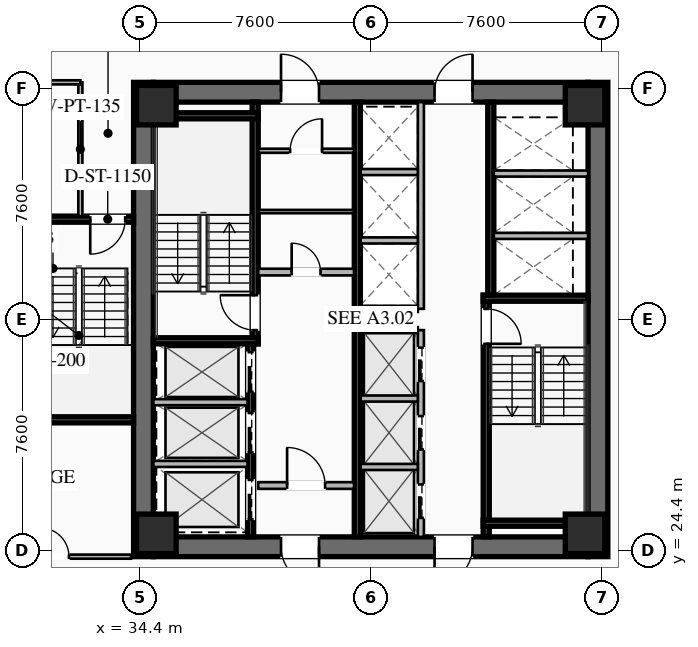
"""IFC4 building model, lengths in metres.
Left out: names, types, materials, properties, quantities, classifications, styles, units other than length and angle.
Written with IfcOpenShell. Run it as: python <this file> out.ifc"""

import sys

from ifc_helpers import new_model, si_unit, direction, frame, frame_2d, origin, origin_2d, place, context, subcontext, project, spatial, rectangle, hollow_rectangle, extrude, element, fill, save


model = new_model("IFC4")
c1 = context("Model", 3, precision=1e-05, world=origin(), true_north=direction((0.0, 1.0)))
c2 = subcontext(c1, "Body", "Model", "MODEL_VIEW")
j1 = project(units=[si_unit("LENGTHUNIT", "METRE"), si_unit("PLANEANGLEUNIT", "RADIAN")], contexts=[c1])
p1 = place(None, origin())
s1 = spatial("IfcSite", under=j1, at=p1, CompositionType="ELEMENT")
p2 = place(p1, origin())
s2 = spatial("IfcBuilding", under=s1, at=p2, CompositionType="ELEMENT")
p3 = place(p2, frame((0.0, 0.0, 42.35)))
s3 = spatial("IfcBuildingStorey", under=s2, at=p3, CompositionType="ELEMENT", Elevation=42.35)
for number, where, z_axis, x_axis in (
    (1, (34.525, 24.2, 0.0), (0.0, 0.0, 1.0), (0.0, 1.0, 0.0)),
    (2, (49.475, 39.8, 0.0), (0.0, 0.0, 1.0), (0.0, -1.0, 0.0)),
):
    element("IfcWall", number, at=place(p3, frame(where, z_axis=z_axis, x_axis=x_axis)), inside=s3, PredefinedType="SHEAR", context=c2, shape_type="SweptSolid", body=[
        extrude(rectangle(XDim=15.6, YDim=0.65, at=frame_2d((7.8, 0.0))), origin(), (0.0, 0.0, 1.0), 3.55),
    ])
p4 = place(p3, frame((49.15, 24.525, 0.0), z_axis=(0.0, 0.0, 1.0), x_axis=(-1.0, 0.0, 0.0)))
e3 = element("IfcWall", 3, at=p4, inside=s3, PredefinedType="SHEAR", context=c2, shape_type="SweptSolid", body=[
    extrude(rectangle(XDim=14.3, YDim=0.65, at=frame_2d((7.15, 0.0))), origin(), (0.0, 0.0, 1.0), 3.55),
])
p5 = place(p4, frame((8.85, 0.0, 0.0)))
e4 = element("IfcOpeningElement", 4, at=p5, cuts=e3, PredefinedType="OPENING", context=c2, shape_type="SweptSolid", body=[
    extrude(rectangle(XDim=1.25, YDim=2.25, at=frame_2d((0.625, 1.125))), frame((0.0, 0.335, 0.0), z_axis=(0.0, -1.0, 0.0), x_axis=(1.0, 0.0, 0.0)), (0.0, 0.0, 1.0), 0.67),
])
p6 = place(p4, frame((3.8, 0.0, 0.0)))
e5 = element("IfcOpeningElement", 5, at=p6, cuts=e3, PredefinedType="OPENING", context=c2, shape_type="SweptSolid", body=[
    extrude(rectangle(XDim=1.25, YDim=2.25, at=frame_2d((0.625, 1.125))), frame((0.0, 0.335, 0.0), z_axis=(0.0, -1.0, 0.0), x_axis=(1.0, 0.0, 0.0)), (0.0, 0.0, 1.0), 0.67),
])
p7 = place(p3, frame((34.85, 39.475, 0.0), z_axis=(0.0, 0.0, 1.0), x_axis=(1.0, 0.0, 0.0)))
e6 = element("IfcWall", 6, at=p7, inside=s3, PredefinedType="SHEAR", context=c2, shape_type="SweptSolid", body=[
    extrude(rectangle(XDim=14.3, YDim=0.65, at=frame_2d((7.15, 0.0))), origin(), (0.0, 0.0, 1.0), 3.55),
])
p8 = place(p7, frame((4.2, 0.0, 0.0)))
e7 = element("IfcOpeningElement", 7, at=p8, cuts=e6, PredefinedType="OPENING", context=c2, shape_type="SweptSolid", body=[
    extrude(rectangle(XDim=1.25, YDim=2.25, at=frame_2d((0.625, 1.125))), frame((0.0, 0.335, 0.0), z_axis=(0.0, -1.0, 0.0), x_axis=(1.0, 0.0, 0.0)), (0.0, 0.0, 1.0), 0.67),
])
p9 = place(p7, frame((9.25, 0.0, 0.0)))
e8 = element("IfcOpeningElement", 8, at=p9, cuts=e6, PredefinedType="OPENING", context=c2, shape_type="SweptSolid", body=[
    extrude(rectangle(XDim=1.25, YDim=2.25, at=frame_2d((0.625, 1.125))), frame((0.0, 0.335, 0.0), z_axis=(0.0, -1.0, 0.0), x_axis=(1.0, 0.0, 0.0)), (0.0, 0.0, 1.0), 0.67),
])
for number, where, z_axis, x_axis in (
    (9, (34.95, 24.95, 0.0), (0.0, 0.0, 1.0), (1.0, 0.0, 0.0)),
    (10, (49.05, 24.95, 0.0), (0.0, 0.0, 1.0), (1.0, 0.0, 0.0)),
    (11, (49.05, 39.05, 0.0), (0.0, 0.0, 1.0), (1.0, 0.0, 0.0)),
    (12, (34.95, 39.05, 0.0), (0.0, 0.0, 1.0), (1.0, 0.0, 0.0)),
):
    element("IfcColumn", number, at=place(p3, frame(where, z_axis=z_axis, x_axis=x_axis)), inside=s3, PredefinedType="COLUMN", context=c2, shape_type="SweptSolid", body=[
        extrude(hollow_rectangle(XDim=1.3, YDim=1.3, WallThickness=0.05, at=origin_2d()), origin(), (0.0, 0.0, 1.0), 3.35),
    ])
p10 = place(p3, frame((38.2, 31.2, 0.0), z_axis=(0.0, 0.0, 1.0), x_axis=(0.0, 1.0, 0.0)))
e13 = element("IfcWall", 13, at=p10, inside=s3, PredefinedType="SHEAR", context=c2, shape_type="SweptSolid", body=[
    extrude(rectangle(XDim=7.95, YDim=0.2, at=frame_2d((3.975, 0.0))), origin(), (0.0, 0.0, 1.0), 3.35),
])
p11 = place(p10, frame((0.45, 0.0, 0.0)))
e14 = element("IfcOpeningElement", 14, at=p11, cuts=e13, PredefinedType="OPENING", context=c2, shape_type="SweptSolid", body=[
    extrude(rectangle(XDim=1.15, YDim=2.2, at=frame_2d((0.575, 1.1))), frame((0.0, 0.11, 0.0), z_axis=(0.0, -1.0, 0.0), x_axis=(1.0, 0.0, 0.0)), (0.0, 0.0, 1.0), 0.22),
])
for number, where, z_axis, x_axis in (
    (15, (34.85, 31.3, 0.0), (0.0, 0.0, 1.0), (1.0, 0.0, 0.0)),
    (16, (34.85, 38.7, 0.0), (0.0, 0.0, 1.0), (1.0, 0.0, 0.0)),
):
    element("IfcWall", number, at=place(p3, frame(where, z_axis=z_axis, x_axis=x_axis)), inside=s3, PredefinedType="SHEAR", context=c2, shape_type="SweptSolid", body=[
        extrude(rectangle(XDim=3.45, YDim=0.2, at=frame_2d((1.725, 0.0))), origin(), (0.0, 0.0, 1.0), 3.35),
    ])
p12 = place(p3, frame((45.8, 32.8, 0.0), z_axis=(0.0, 0.0, 1.0), x_axis=(0.0, -1.0, 0.0)))
e17 = element("IfcWall", 17, at=p12, inside=s3, PredefinedType="SHEAR", context=c2, shape_type="SweptSolid", body=[
    extrude(rectangle(XDim=7.95, YDim=0.2, at=frame_2d((3.975, 0.0))), origin(), (0.0, 0.0, 1.0), 3.35),
])
p13 = place(p12, frame((0.45, 0.0, 0.0)))
e18 = element("IfcOpeningElement", 18, at=p13, cuts=e17, PredefinedType="OPENING", context=c2, shape_type="SweptSolid", body=[
    extrude(rectangle(XDim=1.15, YDim=2.2, at=frame_2d((0.575, 1.1))), frame((0.0, 0.11, 0.0), z_axis=(0.0, -1.0, 0.0), x_axis=(1.0, 0.0, 0.0)), (0.0, 0.0, 1.0), 0.22),
])
for number, where, z_axis, x_axis in (
    (19, (45.7, 32.7, 0.0), (0.0, 0.0, 1.0), (1.0, 0.0, 0.0)),
    (20, (45.7, 25.3, 0.0), (0.0, 0.0, 1.0), (1.0, 0.0, 0.0)),
):
    element("IfcWall", number, at=place(p3, frame(where, z_axis=z_axis, x_axis=x_axis)), inside=s3, PredefinedType="SHEAR", context=c2, shape_type="SweptSolid", body=[
        extrude(rectangle(XDim=3.45, YDim=0.2, at=frame_2d((1.725, 0.0))), origin(), (0.0, 0.0, 1.0), 3.35),
    ])
p14 = place(p3, frame((41.56, 24.85, 0.0), z_axis=(0.0, 0.0, 1.0), x_axis=(0.0, 1.0, 0.0)))
e21 = element("IfcWall", 21, at=p14, inside=s3, PredefinedType="SHEAR", context=c2, shape_type="SweptSolid", body=[
    extrude(rectangle(XDim=14.3, YDim=0.2, at=frame_2d((7.15, 0.0))), origin(), (0.0, 0.0, 1.0), 3.35),
])
p15 = place(p3, frame((38.3, 33.56, 0.0), z_axis=(0.0, 0.0, 1.0), x_axis=(1.0, 0.0, 0.0)))
e22 = element("IfcWall", 22, at=p15, inside=s3, PredefinedType="SOLIDWALL", context=c2, shape_type="SweptSolid", body=[
    extrude(rectangle(XDim=3.15, YDim=0.22, at=frame_2d((1.575, 0.0))), origin(), (0.0, 0.0, 1.0), 2.703),
])
p16 = place(p15, frame((1.1, 0.0, 0.0)))
e23 = element("IfcOpeningElement", 23, at=p16, cuts=e22, PredefinedType="OPENING", context=c2, shape_type="SweptSolid", body=[
    extrude(rectangle(XDim=0.95, YDim=2.05, at=frame_2d((0.475, 1.025))), frame((0.0, 0.12, 0.0), z_axis=(0.0, -1.0, 0.0), x_axis=(1.0, 0.0, 0.0)), (0.0, 0.0, 1.0), 0.24),
])
p17 = place(p3, frame((38.3, 26.54, 0.0), z_axis=(0.0, 0.0, 1.0), x_axis=(1.0, 0.0, 0.0)))
e24 = element("IfcWall", 24, at=p17, inside=s3, PredefinedType="SOLIDWALL", context=c2, shape_type="SweptSolid", body=[
    extrude(rectangle(XDim=3.15, YDim=0.22, at=frame_2d((1.575, 0.0))), origin(), (0.0, 0.0, 1.0), 2.703),
])
p18 = place(p17, frame((0.95, 0.0, 0.0)))
e25 = element("IfcOpeningElement", 25, at=p18, cuts=e24, PredefinedType="OPENING", context=c2, shape_type="SweptSolid", body=[
    extrude(rectangle(XDim=1.25, YDim=2.25, at=frame_2d((0.625, 1.125))), frame((0.0, 0.12, 0.0), z_axis=(0.0, -1.0, 0.0), x_axis=(1.0, 0.0, 0.0)), (0.0, 0.0, 1.0), 0.24),
])
p19 = place(p3, frame((38.05, 24.85, 0.0), z_axis=(0.0, 0.0, 1.0), x_axis=(0.0, 1.0, 0.0)))
e26 = element("IfcWall", 26, at=p19, inside=s3, PredefinedType="SHEAR", context=c2, shape_type="SweptSolid", body=[
    extrude(rectangle(XDim=6.35, YDim=0.2, at=frame_2d((3.175, 0.0))), origin(), (0.0, 0.0, 1.0), 3.35),
])
p20 = place(p19, frame((4.775, 0.0, 0.0)))
e27 = element("IfcOpeningElement", 27, at=p20, cuts=e26, PredefinedType="OPENING", context=c2, shape_type="SweptSolid", body=[
    extrude(rectangle(XDim=1.3, YDim=2.25, at=frame_2d((0.65, 1.125))), frame((0.0, 0.11, 0.0), z_axis=(0.0, -1.0, 0.0), x_axis=(1.0, 0.0, 0.0)), (0.0, 0.0, 1.0), 0.22),
])
p21 = place(p19, frame((2.775, 0.0, 0.0)))
e28 = element("IfcOpeningElement", 28, at=p21, cuts=e26, PredefinedType="OPENING", context=c2, shape_type="SweptSolid", body=[
    extrude(rectangle(XDim=1.3, YDim=2.25, at=frame_2d((0.65, 1.125))), frame((0.0, 0.11, 0.0), z_axis=(0.0, -1.0, 0.0), x_axis=(1.0, 0.0, 0.0)), (0.0, 0.0, 1.0), 0.22),
])
p22 = place(p19, frame((0.575, 0.0, 0.0)))
e29 = element("IfcOpeningElement", 29, at=p22, cuts=e26, PredefinedType="OPENING", context=c2, shape_type="SweptSolid", body=[
    extrude(rectangle(XDim=1.3, YDim=2.25, at=frame_2d((0.65, 1.125))), frame((0.0, 0.11, 0.0), z_axis=(0.0, -1.0, 0.0), x_axis=(1.0, 0.0, 0.0)), (0.0, 0.0, 1.0), 0.22),
])
for number, where, z_axis, x_axis in (
    (30, (34.85, 27.25, 0.0), (0.0, 0.0, 1.0), (1.0, 0.0, 0.0)),
    (31, (34.85, 29.28, 0.0), (0.0, 0.0, 1.0), (1.0, 0.0, 0.0)),
):
    element("IfcWall", number, at=place(p3, frame(where, z_axis=z_axis, x_axis=x_axis)), inside=s3, PredefinedType="SOLIDWALL", context=c2, shape_type="SweptSolid", body=[
        extrude(rectangle(XDim=3.1, YDim=0.2, at=frame_2d((1.55, 0.0))), origin(), (0.0, 0.0, 1.0), 3.35),
    ])
p23 = place(p3, frame((45.95, 39.15, 0.0), z_axis=(0.0, 0.0, 1.0), x_axis=(0.0, -1.0, 0.0)))
e32 = element("IfcWall", 32, at=p23, inside=s3, PredefinedType="SHEAR", context=c2, shape_type="SweptSolid", body=[
    extrude(rectangle(XDim=6.35, YDim=0.2, at=frame_2d((3.175, 0.0))), origin(), (0.0, 0.0, 1.0), 3.35),
])
for number, where, z_axis, x_axis in (
    (33, (46.05, 34.75, 0.0), (0.0, 0.0, 1.0), (1.0, 0.0, 0.0)),
    (34, (46.05, 36.8, 0.0), (0.0, 0.0, 1.0), (1.0, 0.0, 0.0)),
):
    element("IfcWall", number, at=place(p3, frame(where, z_axis=z_axis, x_axis=x_axis)), inside=s3, PredefinedType="SOLIDWALL", context=c2, shape_type="SweptSolid", body=[
        extrude(rectangle(XDim=3.1, YDim=0.2, at=frame_2d((1.55, 0.0))), origin(), (0.0, 0.0, 1.0), 3.35),
    ])
p24 = place(p3, frame((38.3, 37.55, 0.0), z_axis=(0.0, 0.0, 1.0), x_axis=(1.0, 0.0, 0.0)))
e35 = element("IfcWall", 35, at=p24, inside=s3, PredefinedType="PARTITIONING", context=c2, shape_type="SweptSolid", body=[
    extrude(rectangle(XDim=3.15, YDim=0.135, at=frame_2d((1.575, 0.0))), origin(), (0.0, 0.0, 1.0), 2.703),
])
p25 = place(p24, frame((1.05, 0.0, 0.0)))
e36 = element("IfcOpeningElement", 36, at=p25, cuts=e35, PredefinedType="OPENING", context=c2, shape_type="SweptSolid", body=[
    extrude(rectangle(XDim=1.05, YDim=2.2, at=frame_2d((0.525, 1.1))), frame((0.0, 0.077, 0.0), z_axis=(0.0, -1.0, 0.0), x_axis=(1.0, 0.0, 0.0)), (0.0, 0.0, 1.0), 0.155),
])
p26 = place(p3, frame((38.3, 35.55, 0.0), z_axis=(0.0, 0.0, 1.0), x_axis=(1.0, 0.0, 0.0)))
e37 = element("IfcWall", 37, at=p26, inside=s3, PredefinedType="PARTITIONING", context=c2, shape_type="SweptSolid", body=[
    extrude(rectangle(XDim=3.15, YDim=0.11, at=frame_2d((1.575, 0.0))), origin(), (0.0, 0.0, 1.0), 2.703),
])
p27 = place(p3, frame((43.65, 24.85, 0.0), z_axis=(0.0, 0.0, 1.0), x_axis=(0.0, 1.0, 0.0)))
e38 = element("IfcWall", 38, at=p27, inside=s3, PredefinedType="SOLIDWALL", context=c2, shape_type="SweptSolid", body=[
    extrude(rectangle(XDim=6.8, YDim=0.2, at=frame_2d((3.4, 0.0))), origin(), (0.0, 0.0, 1.0), 3.35),
])
p28 = place(p27, frame((0.625, 0.0, 0.0)))
e39 = element("IfcOpeningElement", 39, at=p28, cuts=e38, PredefinedType="OPENING", context=c2, shape_type="SweptSolid", body=[
    extrude(rectangle(XDim=1.1, YDim=2.2, at=frame_2d((0.55, 1.1))), frame((0.0, 0.11, 0.0), z_axis=(0.0, -1.0, 0.0), x_axis=(1.0, 0.0, 0.0)), (0.0, 0.0, 1.0), 0.22),
])
p29 = place(p27, frame((2.875, 0.0, 0.0)))
e40 = element("IfcOpeningElement", 40, at=p29, cuts=e38, PredefinedType="OPENING", context=c2, shape_type="SweptSolid", body=[
    extrude(rectangle(XDim=1.1, YDim=2.2, at=frame_2d((0.55, 1.1))), frame((0.0, 0.11, 0.0), z_axis=(0.0, -1.0, 0.0), x_axis=(1.0, 0.0, 0.0)), (0.0, 0.0, 1.0), 0.22),
])
p30 = place(p27, frame((5.125, 0.0, 0.0)))
e41 = element("IfcOpeningElement", 41, at=p30, cuts=e38, PredefinedType="OPENING", context=c2, shape_type="SweptSolid", body=[
    extrude(rectangle(XDim=1.1, YDim=2.2, at=frame_2d((0.55, 1.1))), frame((0.0, 0.11, 0.0), z_axis=(0.0, -1.0, 0.0), x_axis=(1.0, 0.0, 0.0)), (0.0, 0.0, 1.0), 0.22),
])
for number, where, z_axis, x_axis in (
    (42, (41.67, 27.15, 0.0), (0.0, 0.0, 1.0), (1.0, 0.0, 0.0)),
    (43, (41.67, 29.4, 0.0), (0.0, 0.0, 1.0), (1.0, 0.0, 0.0)),
    (44, (41.67, 31.65, 0.0), (0.0, 0.0, 1.0), (1.0, 0.0, 0.0)),
):
    element("IfcWall", number, at=place(p3, frame(where, z_axis=z_axis, x_axis=x_axis)), inside=s3, PredefinedType="SOLIDWALL", context=c2, shape_type="SweptSolid", body=[
        extrude(rectangle(XDim=1.88, YDim=0.2, at=frame_2d((0.94, 0.0))), origin(), (0.0, 0.0, 1.0), 3.35),
    ])
p31 = place(p3, frame((43.65, 32.35, 0.0), z_axis=(0.0, 0.0, 1.0), x_axis=(0.0, 1.0, 0.0)))
e45 = element("IfcWall", 45, at=p31, inside=s3, PredefinedType="SOLIDWALL", context=c2, shape_type="SweptSolid", body=[
    extrude(rectangle(XDim=6.8, YDim=0.2, at=frame_2d((3.4, 0.0))), origin(), (0.0, 0.0, 1.0), 3.35),
])
for number, where, z_axis, x_axis in (
    (46, (41.67, 32.35, 0.0), (0.0, 0.0, 1.0), (1.0, 0.0, 0.0)),
    (47, (41.67, 34.6, 0.0), (0.0, 0.0, 1.0), (1.0, 0.0, 0.0)),
    (48, (41.67, 36.85, 0.0), (0.0, 0.0, 1.0), (1.0, 0.0, 0.0)),
):
    element("IfcWall", number, at=place(p3, frame(where, z_axis=z_axis, x_axis=x_axis)), inside=s3, PredefinedType="SOLIDWALL", context=c2, shape_type="SweptSolid", body=[
        extrude(rectangle(XDim=1.88, YDim=0.2, at=frame_2d((0.94, 0.0))), origin(), (0.0, 0.0, 1.0), 3.35),
    ])
p32 = place(p3, frame((34.2, 35.3, 0.0), z_axis=(0.0, 0.0, 1.0), x_axis=(-1.0, 0.0, 0.0)))
e49 = element("IfcWall", 49, at=p32, inside=s3, PredefinedType="SHEAR", context=c2, shape_type="SweptSolid", body=[
    extrude(rectangle(XDim=3.4, YDim=0.2, at=frame_2d((1.7, 0.0))), origin(), (0.0, 0.0, 1.0), 3.35),
])
p33 = place(p32, frame((0.275, 0.0, 0.0)))
e50 = element("IfcOpeningElement", 50, at=p33, cuts=e49, PredefinedType="OPENING", context=c2, shape_type="SweptSolid", body=[
    extrude(rectangle(XDim=1.15, YDim=2.2, at=frame_2d((0.575, 1.1))), frame((0.0, 0.11, 0.0), z_axis=(0.0, -1.0, 0.0), x_axis=(1.0, 0.0, 0.0)), (0.0, 0.0, 1.0), 0.22),
])
p34 = place(p3, frame((30.8, 28.7, 0.0), z_axis=(0.0, 0.0, 1.0), x_axis=(1.0, 0.0, 0.0)))
e51 = element("IfcWall", 51, at=p34, inside=s3, PredefinedType="SHEAR", context=c2, shape_type="SweptSolid", body=[
    extrude(rectangle(XDim=3.4, YDim=0.2, at=frame_2d((1.7, 0.0))), origin(), (0.0, 0.0, 1.0), 3.35),
])
p35 = place(p3, frame((32.45, 35.4, 0.0), z_axis=(0.0, 0.0, 1.0), x_axis=(0.0, 1.0, 0.0)))
e52 = element("IfcWall", 52, at=p35, inside=s3, PredefinedType="PARTITIONING", context=c2, shape_type="SweptSolid", body=[
    extrude(rectangle(XDim=4.4, YDim=0.135, at=frame_2d((2.2, 0.0))), origin(), (0.0, 0.0, 1.0), 2.703),
])
p36 = place(p3, frame((32.45, 39.8, 0.0), z_axis=(0.0, 0.0, 1.0), x_axis=(-1.0, 0.0, 0.0)))
e53 = element("IfcWall", 53, at=p36, inside=s3, PredefinedType="PARTITIONING", context=c2, shape_type="SweptSolid", body=[
    extrude(rectangle(XDim=13.18, YDim=0.135, at=frame_2d((6.59, 0.0))), origin(), (0.0, 0.0, 1.0), 2.703),
])
p37 = place(p36, frame((5.84, 0.0, 0.0)))
e54 = element("IfcOpeningElement", 54, at=p37, cuts=e53, PredefinedType="OPENING", context=c2, shape_type="SweptSolid", body=[
    extrude(rectangle(XDim=0.95, YDim=2.05, at=frame_2d((0.475, 1.025))), frame((0.0, 0.077, 0.0), z_axis=(0.0, -1.0, 0.0), x_axis=(1.0, 0.0, 0.0)), (0.0, 0.0, 1.0), 0.155),
])
p38 = place(p3, frame((19.27, 24.2, 0.0), z_axis=(0.0, 0.0, 1.0), x_axis=(1.0, 0.0, 0.0)))
e55 = element("IfcWall", 55, at=p38, inside=s3, PredefinedType="PARTITIONING", context=c2, shape_type="SweptSolid", body=[
    extrude(rectangle(XDim=14.85, YDim=0.135, at=frame_2d((7.425, 0.0))), origin(), (0.0, 0.0, 1.0), 2.703),
])
p39 = place(p38, frame((11.855, 0.0, 0.0)))
e56 = element("IfcOpeningElement", 56, at=p39, cuts=e55, PredefinedType="OPENING", context=c2, shape_type="SweptSolid", body=[
    extrude(rectangle(XDim=0.95, YDim=2.05, at=frame_2d((0.475, 1.025))), frame((0.0, 0.077, 0.0), z_axis=(0.0, -1.0, 0.0), x_axis=(1.0, 0.0, 0.0)), (0.0, 0.0, 1.0), 0.155),
])
p40 = place(p8, origin())
e57 = element("IfcDoor", 57, at=p40, inside=s3, OperationType="SINGLE_SWING_LEFT", PredefinedType="DOOR", context=c2, shape_type="SweptSolid", body=[
    extrude(rectangle(XDim=1.25, YDim=2.25, at=frame_2d((0.625, 1.125))), frame((0.0, 0.025, 0.0), z_axis=(0.0, -1.0, 0.0), x_axis=(1.0, 0.0, 0.0)), (0.0, 0.0, 1.0), 0.05),
])
fill(e7, e57)
p41 = place(p9, origin())
e58 = element("IfcDoor", 58, at=p41, inside=s3, OperationType="SINGLE_SWING_RIGHT", PredefinedType="DOOR", context=c2, shape_type="SweptSolid", body=[
    extrude(rectangle(XDim=1.25, YDim=2.25, at=frame_2d((0.625, 1.125))), frame((0.0, 0.025, 0.0), z_axis=(0.0, -1.0, 0.0), x_axis=(1.0, 0.0, 0.0)), (0.0, 0.0, 1.0), 0.05),
])
fill(e8, e58)
p42 = place(p5, origin())
e59 = element("IfcDoor", 59, at=p42, inside=s3, OperationType="SINGLE_SWING_LEFT", PredefinedType="DOOR", context=c2, shape_type="SweptSolid", body=[
    extrude(rectangle(XDim=1.25, YDim=2.25, at=frame_2d((0.625, 1.125))), frame((0.0, 0.025, 0.0), z_axis=(0.0, -1.0, 0.0), x_axis=(1.0, 0.0, 0.0)), (0.0, 0.0, 1.0), 0.05),
])
fill(e4, e59)
p43 = place(p6, origin())
e60 = element("IfcDoor", 60, at=p43, inside=s3, OperationType="SINGLE_SWING_RIGHT", PredefinedType="DOOR", context=c2, shape_type="SweptSolid", body=[
    extrude(rectangle(XDim=1.25, YDim=2.25, at=frame_2d((0.625, 1.125))), frame((0.0, 0.025, 0.0), z_axis=(0.0, -1.0, 0.0), x_axis=(1.0, 0.0, 0.0)), (0.0, 0.0, 1.0), 0.05),
])
fill(e5, e60)
p44 = place(p11, origin())
e61 = element("IfcDoor", 61, at=p44, inside=s3, OperationType="SINGLE_SWING_RIGHT", PredefinedType="DOOR", context=c2, shape_type="SweptSolid", body=[
    extrude(rectangle(XDim=1.15, YDim=2.2, at=frame_2d((0.575, 1.1))), frame((0.0, 0.025, 0.0), z_axis=(0.0, -1.0, 0.0), x_axis=(1.0, 0.0, 0.0)), (0.0, 0.0, 1.0), 0.05),
])
fill(e14, e61)
p45 = place(p13, origin())
e62 = element("IfcDoor", 62, at=p45, inside=s3, OperationType="SINGLE_SWING_RIGHT", PredefinedType="DOOR", context=c2, shape_type="SweptSolid", body=[
    extrude(rectangle(XDim=1.15, YDim=2.2, at=frame_2d((0.575, 1.1))), frame((0.0, 0.025, 0.0), z_axis=(0.0, -1.0, 0.0), x_axis=(1.0, 0.0, 0.0)), (0.0, 0.0, 1.0), 0.05),
])
fill(e18, e62)
p46 = place(p18, origin())
e63 = element("IfcDoor", 63, at=p46, inside=s3, OperationType="SINGLE_SWING_LEFT", PredefinedType="DOOR", context=c2, shape_type="SweptSolid", body=[
    extrude(rectangle(XDim=1.25, YDim=2.25, at=frame_2d((0.625, 1.125))), frame((0.0, 0.025, 0.0), z_axis=(0.0, -1.0, 0.0), x_axis=(1.0, 0.0, 0.0)), (0.0, 0.0, 1.0), 0.05),
])
fill(e25, e63)
p47 = place(p25, origin())
e64 = element("IfcDoor", 64, at=p47, inside=s3, OperationType="SINGLE_SWING_RIGHT", PredefinedType="DOOR", context=c2, shape_type="SweptSolid", body=[
    extrude(rectangle(XDim=1.05, YDim=2.2, at=frame_2d((0.525, 1.1))), frame((0.0, 0.025, 0.0), z_axis=(0.0, -1.0, 0.0), x_axis=(1.0, 0.0, 0.0)), (0.0, 0.0, 1.0), 0.05),
])
fill(e36, e64)
p48 = place(p16, origin())
e65 = element("IfcDoor", 65, at=p48, inside=s3, OperationType="SINGLE_SWING_LEFT", PredefinedType="DOOR", context=c2, shape_type="SweptSolid", body=[
    extrude(rectangle(XDim=0.95, YDim=2.05, at=frame_2d((0.475, 1.025))), frame((0.0, 0.025, 0.0), z_axis=(0.0, -1.0, 0.0), x_axis=(1.0, 0.0, 0.0)), (0.0, 0.0, 1.0), 0.05),
])
fill(e23, e65)
p49 = place(p33, origin())
e66 = element("IfcDoor", 66, at=p49, inside=s3, OperationType="SINGLE_SWING_RIGHT", PredefinedType="DOOR", context=c2, shape_type="SweptSolid", body=[
    extrude(rectangle(XDim=1.15, YDim=2.2, at=frame_2d((0.575, 1.1))), frame((0.0, 0.025, 0.0), z_axis=(0.0, -1.0, 0.0), x_axis=(1.0, 0.0, 0.0)), (0.0, 0.0, 1.0), 0.05),
])
fill(e50, e66)
p50 = place(p39, origin())
e67 = element("IfcDoor", 67, at=p50, inside=s3, OperationType="SINGLE_SWING_LEFT", PredefinedType="DOOR", context=c2, shape_type="SweptSolid", body=[
    extrude(rectangle(XDim=0.95, YDim=2.05, at=frame_2d((0.475, 1.025))), frame((0.0, 0.025, 0.0), z_axis=(0.0, -1.0, 0.0), x_axis=(1.0, 0.0, 0.0)), (0.0, 0.0, 1.0), 0.05),
])
fill(e56, e67)
p51 = place(p20, origin())
e68 = element("IfcDoor", 68, at=p51, inside=s3, OperationType="SLIDING_TO_LEFT", PredefinedType="DOOR", context=c2, shape_type="SweptSolid", body=[
    extrude(rectangle(XDim=1.3, YDim=2.25, at=frame_2d((0.65, 1.125))), frame((0.0, 0.025, 0.0), z_axis=(0.0, -1.0, 0.0), x_axis=(1.0, 0.0, 0.0)), (0.0, 0.0, 1.0), 0.05),
])
fill(e27, e68)
p52 = place(p21, origin())
e69 = element("IfcDoor", 69, at=p52, inside=s3, OperationType="SLIDING_TO_LEFT", PredefinedType="DOOR", context=c2, shape_type="SweptSolid", body=[
    extrude(rectangle(XDim=1.3, YDim=2.25, at=frame_2d((0.65, 1.125))), frame((0.0, 0.025, 0.0), z_axis=(0.0, -1.0, 0.0), x_axis=(1.0, 0.0, 0.0)), (0.0, 0.0, 1.0), 0.05),
])
fill(e28, e69)
p53 = place(p22, origin())
e70 = element("IfcDoor", 70, at=p53, inside=s3, OperationType="SLIDING_TO_LEFT", PredefinedType="DOOR", context=c2, shape_type="SweptSolid", body=[
    extrude(rectangle(XDim=1.3, YDim=2.25, at=frame_2d((0.65, 1.125))), frame((0.0, 0.025, 0.0), z_axis=(0.0, -1.0, 0.0), x_axis=(1.0, 0.0, 0.0)), (0.0, 0.0, 1.0), 0.05),
])
fill(e29, e70)
p54 = place(p28, origin())
e71 = element("IfcDoor", 71, at=p54, inside=s3, OperationType="SLIDING_TO_LEFT", PredefinedType="DOOR", context=c2, shape_type="SweptSolid", body=[
    extrude(rectangle(XDim=1.1, YDim=2.2, at=frame_2d((0.55, 1.1))), frame((0.0, 0.025, 0.0), z_axis=(0.0, -1.0, 0.0), x_axis=(1.0, 0.0, 0.0)), (0.0, 0.0, 1.0), 0.05),
])
fill(e39, e71)
p55 = place(p29, origin())
e72 = element("IfcDoor", 72, at=p55, inside=s3, OperationType="SLIDING_TO_LEFT", PredefinedType="DOOR", context=c2, shape_type="SweptSolid", body=[
    extrude(rectangle(XDim=1.1, YDim=2.2, at=frame_2d((0.55, 1.1))), frame((0.0, 0.025, 0.0), z_axis=(0.0, -1.0, 0.0), x_axis=(1.0, 0.0, 0.0)), (0.0, 0.0, 1.0), 0.05),
])
fill(e40, e72)
p56 = place(p30, origin())
e73 = element("IfcDoor", 73, at=p56, inside=s3, OperationType="SLIDING_TO_LEFT", PredefinedType="DOOR", context=c2, shape_type="SweptSolid", body=[
    extrude(rectangle(XDim=1.1, YDim=2.2, at=frame_2d((0.55, 1.1))), frame((0.0, 0.025, 0.0), z_axis=(0.0, -1.0, 0.0), x_axis=(1.0, 0.0, 0.0)), (0.0, 0.0, 1.0), 0.05),
])
fill(e41, e73)
save(model, sys.argv[1])
